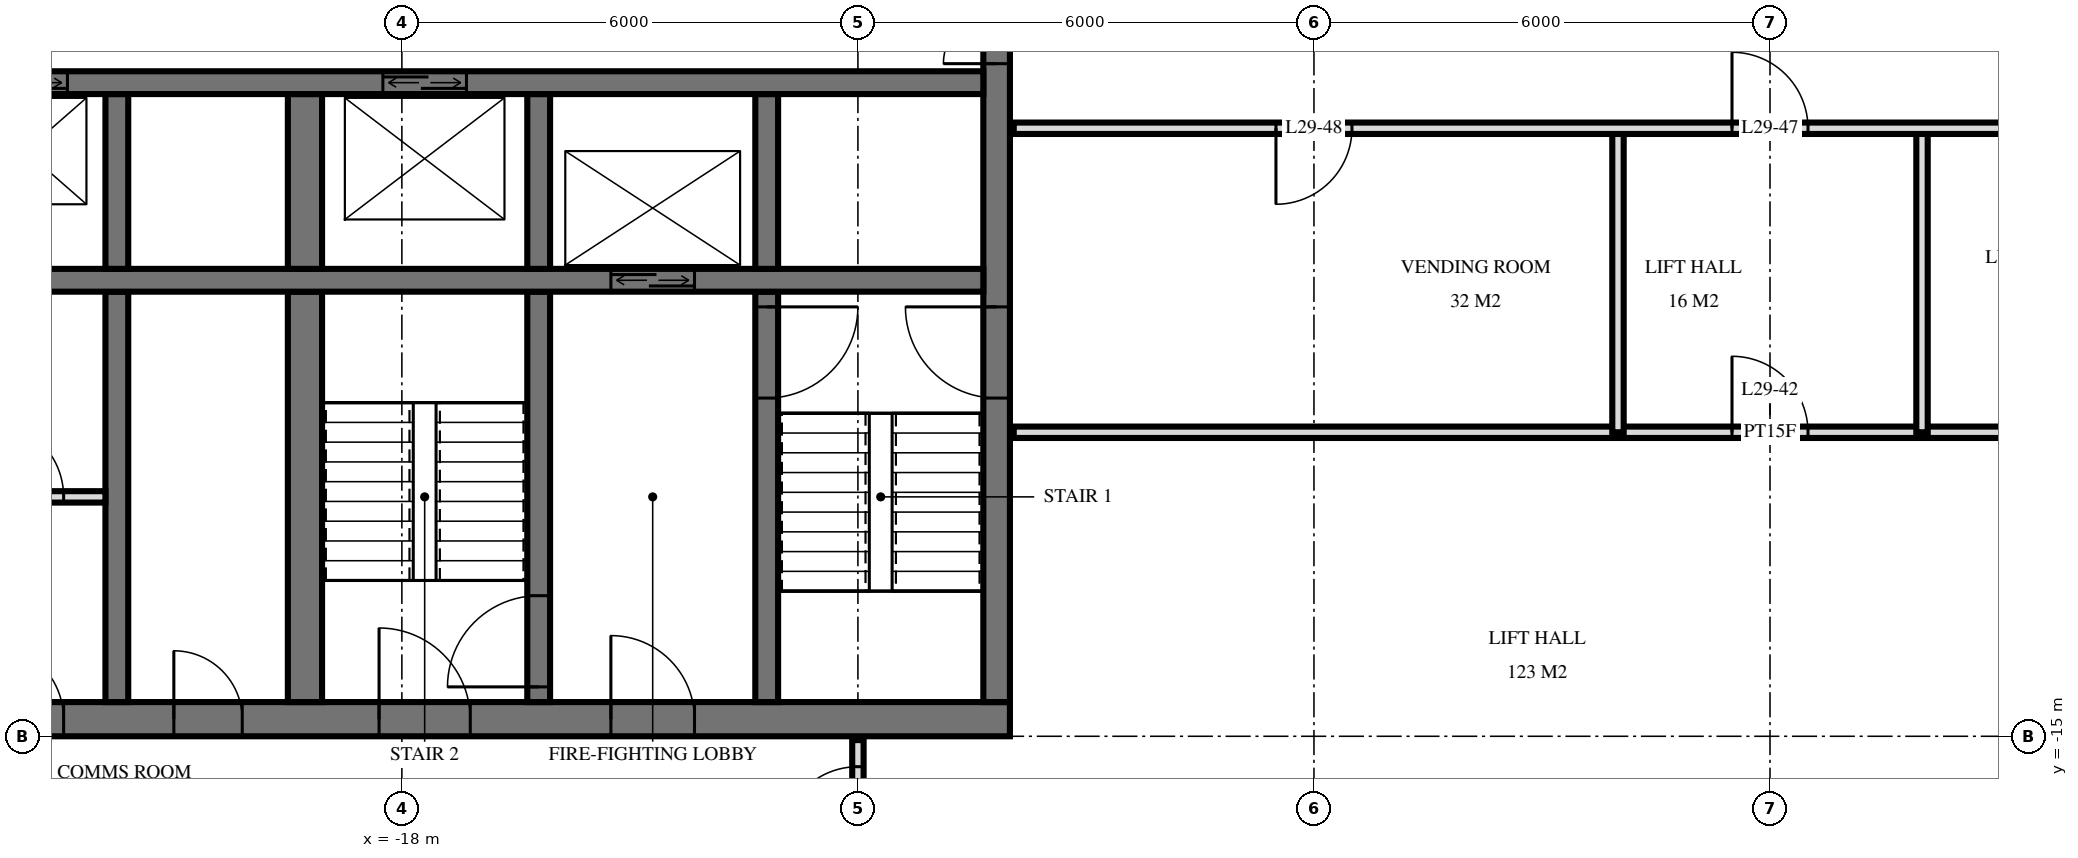
"""IFC4 building model, lengths in metres.
Left out: names, types, materials, properties, quantities, classifications, styles, units other than length and angle.
Written with IfcOpenShell. Run it as: python <this file> out.ifc"""

import sys

from ifc_helpers import new_model, si_unit, direction, frame, frame_2d, origin, place, context, subcontext, project, spatial, rectangle, extrude, element, fill, save


model = new_model("IFC4")
c1 = context("Model", 3, precision=1e-05, world=origin(), true_north=direction((0.0, 1.0)))
c2 = subcontext(c1, "Body", "Model", "MODEL_VIEW")
j1 = project(units=[si_unit("LENGTHUNIT", "METRE"), si_unit("PLANEANGLEUNIT", "RADIAN")], contexts=[c1])
p1 = place(None, origin())
s1 = spatial("IfcSite", under=j1, at=p1, CompositionType="ELEMENT")
p2 = place(p1, origin())
s2 = spatial("IfcBuilding", under=s1, at=p2, CompositionType="ELEMENT")
p3 = place(p2, frame((0.0, 0.0, 116.4)))
s3 = spatial("IfcBuildingStorey", under=s2, at=p3, CompositionType="ELEMENT", Elevation=116.4)
p4 = place(p3, frame((-24.5, -14.775, 0.0), z_axis=(0.0, 0.0, 1.0), x_axis=(1.0, 0.0, 0.0)))
e1 = element("IfcWall", 1, at=p4, inside=s3, PredefinedType="SHEAR", context=c2, shape_type="SweptSolid", body=[
    extrude(rectangle(XDim=14.5, YDim=0.45, at=frame_2d((7.25, 0.0))), origin(), (0.0, 0.0, 1.0), 3.6),
])
p5 = place(p4, frame((6.2, 0.0, 0.0)))
e2 = element("IfcOpeningElement", 2, at=p5, cuts=e1, PredefinedType="OPENING", context=c2, shape_type="SweptSolid", body=[
    extrude(rectangle(XDim=1.2, YDim=2.1, at=frame_2d((0.6, 1.05))), frame((0.0, 0.235, 0.0), z_axis=(0.0, -1.0, 0.0), x_axis=(1.0, 0.0, 0.0)), (0.0, 0.0, 1.0), 0.47),
])
p6 = place(p4, frame((9.25, 0.0, 0.0)))
e3 = element("IfcOpeningElement", 3, at=p6, cuts=e1, PredefinedType="OPENING", context=c2, shape_type="SweptSolid", body=[
    extrude(rectangle(XDim=1.1, YDim=2.1, at=frame_2d((0.55, 1.05))), frame((0.0, 0.235, 0.0), z_axis=(0.0, -1.0, 0.0), x_axis=(1.0, 0.0, 0.0)), (0.0, 0.0, 1.0), 0.47),
])
p7 = place(p4, frame((3.5, 0.0, 0.0)))
e4 = element("IfcOpeningElement", 4, at=p7, cuts=e1, PredefinedType="OPENING", context=c2, shape_type="SweptSolid", body=[
    extrude(rectangle(XDim=0.9, YDim=2.1, at=frame_2d((0.45, 1.05))), frame((0.0, 0.235, 0.0), z_axis=(0.0, -1.0, 0.0), x_axis=(1.0, 0.0, 0.0)), (0.0, 0.0, 1.0), 0.47),
])
p8 = place(p4, frame((1.05, 0.0, 0.0)))
e5 = element("IfcOpeningElement", 5, at=p8, cuts=e1, PredefinedType="OPENING", context=c2, shape_type="SweptSolid", body=[
    extrude(rectangle(XDim=1.0, YDim=2.1, at=frame_2d((0.5, 1.05))), frame((0.0, 0.235, 0.0), z_axis=(0.0, -1.0, 0.0), x_axis=(1.0, 0.0, 0.0)), (0.0, 0.0, 1.0), 0.47),
])
p9 = place(p3, frame((-10.175, -14.55, 0.0), z_axis=(0.0, 0.0, 1.0), x_axis=(0.0, 1.0, 0.0)))
e6 = element("IfcWall", 6, at=p9, inside=s3, PredefinedType="SHEAR", context=c2, shape_type="SweptSolid", body=[
    extrude(rectangle(XDim=14.1, YDim=0.35, at=frame_2d((7.05, 0.0))), origin(), (0.0, 0.0, 1.0), 3.6),
])
p10 = place(p9, frame((8.4, 0.0, 0.0)))
e7 = element("IfcOpeningElement", 7, at=p10, cuts=e6, PredefinedType="OPENING", context=c2, shape_type="SweptSolid", body=[
    extrude(rectangle(XDim=1.4, YDim=2.4, at=frame_2d((0.7, 1.2))), frame((0.0, 0.185, 0.0), z_axis=(0.0, -1.0, 0.0), x_axis=(1.0, 0.0, 0.0)), (0.0, 0.0, 1.0), 0.37),
])
p11 = place(p9, frame((10.0, 0.0, 0.0)))
e8 = element("IfcOpeningElement", 8, at=p11, cuts=e6, PredefinedType="OPENING", context=c2, shape_type="SweptSolid", body=[
    extrude(rectangle(XDim=1.4, YDim=2.4, at=frame_2d((0.7, 1.2))), frame((0.0, 0.185, 0.0), z_axis=(0.0, -1.0, 0.0), x_axis=(1.0, 0.0, 0.0)), (0.0, 0.0, 1.0), 0.37),
])
p12 = place(p9, frame((4.0, 0.0, 0.0)))
e9 = element("IfcOpeningElement", 9, at=p12, cuts=e6, PredefinedType="OPENING", context=c2, shape_type="SweptSolid", body=[
    extrude(rectangle(XDim=1.2, YDim=2.1, at=frame_2d((0.6, 1.05))), frame((0.0, 0.185, 0.0), z_axis=(0.0, -1.0, 0.0), x_axis=(1.0, 0.0, 0.0)), (0.0, 0.0, 1.0), 0.37),
])
p13 = place(p3, frame((-24.05, -6.4, 0.0), z_axis=(0.0, 0.0, 1.0), x_axis=(1.0, 0.0, 0.0)))
e10 = element("IfcWall", 10, at=p13, inside=s3, PredefinedType="SHEAR", context=c2, shape_type="SweptSolid", body=[
    extrude(rectangle(XDim=13.7, YDim=0.3, at=frame_2d((6.85, 0.0))), origin(), (0.0, 0.0, 1.0), 3.6),
])
p14 = place(p13, frame((0.55, 0.0, 0.0)))
e11 = element("IfcOpeningElement", 11, at=p14, cuts=e10, PredefinedType="OPENING", context=c2, shape_type="SweptSolid", body=[
    extrude(rectangle(XDim=1.1, YDim=2.1, at=frame_2d((0.55, 1.05))), frame((0.0, 0.16, 0.0), z_axis=(0.0, -1.0, 0.0), x_axis=(1.0, 0.0, 0.0)), (0.0, 0.0, 1.0), 0.32),
])
p15 = place(p13, frame((5.8, 0.0, 0.0)))
e12 = element("IfcOpeningElement", 12, at=p15, cuts=e10, PredefinedType="OPENING", context=c2, shape_type="SweptSolid", body=[
    extrude(rectangle(XDim=1.1, YDim=2.1, at=frame_2d((0.55, 1.05))), frame((0.0, 0.16, 0.0), z_axis=(0.0, -1.0, 0.0), x_axis=(1.0, 0.0, 0.0)), (0.0, 0.0, 1.0), 0.32),
])
p16 = place(p3, frame((-24.05, -9.0, 0.0), z_axis=(0.0, 0.0, 1.0), x_axis=(1.0, 0.0, 0.0)))
e13 = element("IfcWall", 13, at=p16, inside=s3, PredefinedType="SHEAR", context=c2, shape_type="SweptSolid", body=[
    extrude(rectangle(XDim=13.7, YDim=0.3, at=frame_2d((6.85, 0.0))), origin(), (0.0, 0.0, 1.0), 3.6),
])
p17 = place(p16, frame((8.8, 0.0, 0.0)))
e14 = element("IfcOpeningElement", 14, at=p17, cuts=e13, PredefinedType="OPENING", context=c2, shape_type="SweptSolid", body=[
    extrude(rectangle(XDim=1.1, YDim=2.1, at=frame_2d((0.55, 1.05))), frame((0.0, 0.16, 0.0), z_axis=(0.0, -1.0, 0.0), x_axis=(1.0, 0.0, 0.0)), (0.0, 0.0, 1.0), 0.32),
])
p18 = place(p3, frame((-13.2, -8.85, 0.0), z_axis=(0.0, 0.0, 1.0), x_axis=(0.0, 1.0, 0.0)))
e15 = element("IfcWall", 15, at=p18, inside=s3, PredefinedType="SHEAR", context=c2, shape_type="SweptSolid", body=[
    extrude(rectangle(XDim=2.3, YDim=0.3, at=frame_2d((1.15, 0.0))), origin(), (0.0, 0.0, 1.0), 3.6),
])
p19 = place(p3, frame((-13.2, -14.55, 0.0), z_axis=(0.0, 0.0, 1.0), x_axis=(0.0, 1.0, 0.0)))
e16 = element("IfcWall", 16, at=p19, inside=s3, PredefinedType="SHEAR", context=c2, shape_type="SweptSolid", body=[
    extrude(rectangle(XDim=5.4, YDim=0.3, at=frame_2d((2.7, 0.0))), origin(), (0.0, 0.0, 1.0), 3.6),
])
p20 = place(p19, frame((4.0, 0.0, 0.0)))
e17 = element("IfcOpeningElement", 17, at=p20, cuts=e16, PredefinedType="OPENING", context=c2, shape_type="SweptSolid", body=[
    extrude(rectangle(XDim=1.2, YDim=2.1, at=frame_2d((0.6, 1.05))), frame((0.0, 0.16, 0.0), z_axis=(0.0, -1.0, 0.0), x_axis=(1.0, 0.0, 0.0)), (0.0, 0.0, 1.0), 0.32),
])
p21 = place(p3, frame((-16.2, -8.85, 0.0), z_axis=(0.0, 0.0, 1.0), x_axis=(0.0, 1.0, 0.0)))
e18 = element("IfcWall", 18, at=p21, inside=s3, PredefinedType="SHEAR", context=c2, shape_type="SweptSolid", body=[
    extrude(rectangle(XDim=2.3, YDim=0.3, at=frame_2d((1.15, 0.0))), origin(), (0.0, 0.0, 1.0), 3.6),
])
p22 = place(p3, frame((-16.2, -14.55, 0.0), z_axis=(0.0, 0.0, 1.0), x_axis=(0.0, 1.0, 0.0)))
e19 = element("IfcWall", 19, at=p22, inside=s3, PredefinedType="SHEAR", context=c2, shape_type="SweptSolid", body=[
    extrude(rectangle(XDim=5.4, YDim=0.3, at=frame_2d((2.7, 0.0))), origin(), (0.0, 0.0, 1.0), 3.6),
])
p23 = place(p22, frame((0.2, 0.0, 0.0)))
e20 = element("IfcOpeningElement", 20, at=p23, cuts=e19, PredefinedType="OPENING", context=c2, shape_type="SweptSolid", body=[
    extrude(rectangle(XDim=1.2, YDim=2.1, at=frame_2d((0.6, 1.05))), frame((0.0, 0.16, 0.0), z_axis=(0.0, -1.0, 0.0), x_axis=(1.0, 0.0, 0.0)), (0.0, 0.0, 1.0), 0.32),
])
p24 = place(p3, frame((-19.275, -8.85, 0.0), z_axis=(0.0, 0.0, 1.0), x_axis=(0.0, 1.0, 0.0)))
e21 = element("IfcWall", 21, at=p24, inside=s3, PredefinedType="SHEAR", context=c2, shape_type="SweptSolid", body=[
    extrude(rectangle(XDim=2.3, YDim=0.45, at=frame_2d((1.15, 0.0))), origin(), (0.0, 0.0, 1.0), 3.6),
])
p25 = place(p3, frame((-19.275, -14.55, 0.0), z_axis=(0.0, 0.0, 1.0), x_axis=(0.0, 1.0, 0.0)))
e22 = element("IfcWall", 22, at=p25, inside=s3, PredefinedType="SHEAR", context=c2, shape_type="SweptSolid", body=[
    extrude(rectangle(XDim=5.4, YDim=0.45, at=frame_2d((2.7, 0.0))), origin(), (0.0, 0.0, 1.0), 3.6),
])
p26 = place(p3, frame((-21.75, -8.85, 0.0), z_axis=(0.0, 0.0, 1.0), x_axis=(0.0, 1.0, 0.0)))
e23 = element("IfcWall", 23, at=p26, inside=s3, PredefinedType="SHEAR", context=c2, shape_type="SweptSolid", body=[
    extrude(rectangle(XDim=2.3, YDim=0.3, at=frame_2d((1.15, 0.0))), origin(), (0.0, 0.0, 1.0), 3.6),
])
p27 = place(p3, frame((-21.75, -14.55, 0.0), z_axis=(0.0, 0.0, 1.0), x_axis=(0.0, 1.0, 0.0)))
e24 = element("IfcWall", 24, at=p27, inside=s3, PredefinedType="SHEAR", context=c2, shape_type="SweptSolid", body=[
    extrude(rectangle(XDim=5.4, YDim=0.3, at=frame_2d((2.7, 0.0))), origin(), (0.0, 0.0, 1.0), 3.6),
])
p28 = place(p3, frame((-24.0, -11.85, 0.0), z_axis=(0.0, 0.0, 1.0), x_axis=(1.0, 0.0, 0.0)))
e25 = element("IfcWall", 25, at=p28, inside=s3, PredefinedType="PARTITIONING", context=c2, shape_type="SweptSolid", body=[
    extrude(rectangle(XDim=2.1, YDim=0.15, at=frame_2d((1.05, 0.0))), origin(), (0.0, 0.0, 1.0), 3.3),
])
p29 = place(p28, frame((0.55, 0.0, 0.0)))
e26 = element("IfcOpeningElement", 26, at=p29, cuts=e25, PredefinedType="OPENING", context=c2, shape_type="SweptSolid", body=[
    extrude(rectangle(XDim=1.0, YDim=2.1, at=frame_2d((0.5, 1.05))), frame((0.0, 0.085, 0.0), z_axis=(0.0, -1.0, 0.0), x_axis=(1.0, 0.0, 0.0)), (0.0, 0.0, 1.0), 0.17),
])
for number, where, z_axis, x_axis in (
    (27, (2.0, -11.0, 0.0), (0.0, 0.0, 1.0), (0.0, 1.0, 0.0)),
    (28, (-2.0, -11.0, 0.0), (0.0, 0.0, 1.0), (0.0, 1.0, 0.0)),
):
    element("IfcWall", number, at=place(p3, frame(where, z_axis=z_axis, x_axis=x_axis)), inside=s3, PredefinedType="PARTITIONING", context=c2, shape_type="SweptSolid", body=[
        extrude(rectangle(XDim=4.0, YDim=0.15, at=frame_2d((2.0, 0.0))), origin(), (0.0, 0.0, 1.0), 3.32),
    ])
p30 = place(p3, frame((-12.0, -16.8, 0.0), z_axis=(0.0, 0.0, 1.0), x_axis=(0.0, 1.0, 0.0)))
e29 = element("IfcWall", 29, at=p30, inside=s3, PredefinedType="PARTITIONING", context=c2, shape_type="SweptSolid", body=[
    extrude(rectangle(XDim=1.75, YDim=0.15, at=frame_2d((0.875, 0.0))), origin(), (0.0, 0.0, 1.0), 3.32),
])
p31 = place(p30, frame((0.4, 0.0, 0.0)))
e30 = element("IfcOpeningElement", 30, at=p31, cuts=e29, PredefinedType="OPENING", context=c2, shape_type="SweptSolid", body=[
    extrude(rectangle(XDim=1.0, YDim=2.1, at=frame_2d((0.5, 1.05))), frame((0.0, 0.085, 0.0), z_axis=(0.0, -1.0, 0.0), x_axis=(1.0, 0.0, 0.0)), (0.0, 0.0, 1.0), 0.17),
])
p32 = place(p3, frame((-9.95, -11.0, 0.0), z_axis=(0.0, 0.0, 1.0), x_axis=(1.0, 0.0, 0.0)))
e31 = element("IfcWall", 31, at=p32, inside=s3, PredefinedType="PARTITIONING", context=c2, shape_type="SweptSolid", body=[
    extrude(rectangle(XDim=19.9, YDim=0.15, at=frame_2d((9.95, 0.0))), origin(), (0.0, 0.0, 1.0), 3.32),
])
p33 = place(p32, frame((9.45, 0.0, 0.0)))
e32 = element("IfcOpeningElement", 32, at=p33, cuts=e31, PredefinedType="OPENING", context=c2, shape_type="SweptSolid", body=[
    extrude(rectangle(XDim=1.0, YDim=2.1, at=frame_2d((0.5, 1.05))), frame((0.0, 0.085, 0.0), z_axis=(0.0, -1.0, 0.0), x_axis=(1.0, 0.0, 0.0)), (0.0, 0.0, 1.0), 0.17),
])
p34 = place(p32, frame((15.45, 0.0, 0.0)))
e33 = element("IfcOpeningElement", 33, at=p34, cuts=e31, PredefinedType="OPENING", context=c2, shape_type="SweptSolid", body=[
    extrude(rectangle(XDim=1.0, YDim=2.1, at=frame_2d((0.5, 1.05))), frame((0.0, 0.085, 0.0), z_axis=(0.0, -1.0, 0.0), x_axis=(1.0, 0.0, 0.0)), (0.0, 0.0, 1.0), 0.17),
])
p35 = place(p3, frame((-9.95, -7.0, 0.0), z_axis=(0.0, 0.0, 1.0), x_axis=(1.0, 0.0, 0.0)))
e34 = element("IfcWall", 34, at=p35, inside=s3, PredefinedType="PARTITIONING", context=c2, shape_type="SweptSolid", body=[
    extrude(rectangle(XDim=19.9, YDim=0.15, at=frame_2d((9.95, 0.0))), origin(), (0.0, 0.0, 1.0), 3.32),
])
p36 = place(p35, frame((9.45, 0.0, 0.0)))
e35 = element("IfcOpeningElement", 35, at=p36, cuts=e34, PredefinedType="OPENING", context=c2, shape_type="SweptSolid", body=[
    extrude(rectangle(XDim=1.0, YDim=2.1, at=frame_2d((0.5, 1.05))), frame((0.0, 0.085, 0.0), z_axis=(0.0, -1.0, 0.0), x_axis=(1.0, 0.0, 0.0)), (0.0, 0.0, 1.0), 0.17),
])
p37 = place(p35, frame((3.45, 0.0, 0.0)))
e36 = element("IfcOpeningElement", 36, at=p37, cuts=e34, PredefinedType="OPENING", context=c2, shape_type="SweptSolid", body=[
    extrude(rectangle(XDim=1.0, YDim=2.1, at=frame_2d((0.5, 1.05))), frame((0.0, 0.085, 0.0), z_axis=(0.0, -1.0, 0.0), x_axis=(1.0, 0.0, 0.0)), (0.0, 0.0, 1.0), 0.17),
])
p38 = place(p14, origin())
e37 = element("IfcDoor", 37, at=p38, inside=s3, OperationType="DOUBLE_DOOR_SLIDING", PredefinedType="USERDEFINED", context=c2, shape_type="SweptSolid", body=[
    extrude(rectangle(XDim=1.1, YDim=2.1, at=frame_2d((0.55, 1.05))), frame((0.0, 0.025, 0.0), z_axis=(0.0, -1.0, 0.0), x_axis=(1.0, 0.0, 0.0)), (0.0, 0.0, 1.0), 0.05),
])
fill(e11, e37)
p39 = place(p17, origin())
e38 = element("IfcDoor", 38, at=p39, inside=s3, OperationType="DOUBLE_DOOR_SLIDING", PredefinedType="USERDEFINED", context=c2, shape_type="SweptSolid", body=[
    extrude(rectangle(XDim=1.1, YDim=2.1, at=frame_2d((0.55, 1.05))), frame((0.0, 0.025, 0.0), z_axis=(0.0, -1.0, 0.0), x_axis=(1.0, 0.0, 0.0)), (0.0, 0.0, 1.0), 0.05),
])
fill(e14, e38)
p40 = place(p15, origin())
e39 = element("IfcDoor", 39, at=p40, inside=s3, OperationType="DOUBLE_DOOR_SLIDING", PredefinedType="USERDEFINED", context=c2, shape_type="SweptSolid", body=[
    extrude(rectangle(XDim=1.1, YDim=2.1, at=frame_2d((0.55, 1.05))), frame((0.0, 0.025, 0.0), z_axis=(0.0, -1.0, 0.0), x_axis=(1.0, 0.0, 0.0)), (0.0, 0.0, 1.0), 0.05),
])
fill(e12, e39)
p41 = place(p10, origin())
e40 = element("IfcDoor", 40, at=p41, inside=s3, OperationType="DOUBLE_DOOR_SINGLE_SWING", PredefinedType="DOOR", context=c2, shape_type="SweptSolid", body=[
    extrude(rectangle(XDim=1.4, YDim=2.4, at=frame_2d((0.7, 1.2))), frame((0.0, 0.025, 0.0), z_axis=(0.0, -1.0, 0.0), x_axis=(1.0, 0.0, 0.0)), (0.0, 0.0, 1.0), 0.05),
])
fill(e7, e40)
p42 = place(p12, origin())
e41 = element("IfcDoor", 41, at=p42, inside=s3, OperationType="SINGLE_SWING_LEFT", PredefinedType="DOOR", context=c2, shape_type="SweptSolid", body=[
    extrude(rectangle(XDim=1.2, YDim=2.1, at=frame_2d((0.6, 1.05))), frame((0.0, 0.025, 0.0), z_axis=(0.0, -1.0, 0.0), x_axis=(1.0, 0.0, 0.0)), (0.0, 0.0, 1.0), 0.05),
])
fill(e9, e41)
p43 = place(p5, origin())
e42 = element("IfcDoor", 42, at=p43, inside=s3, OperationType="SINGLE_SWING_RIGHT", PredefinedType="DOOR", context=c2, shape_type="SweptSolid", body=[
    extrude(rectangle(XDim=1.2, YDim=2.1, at=frame_2d((0.6, 1.05))), frame((0.0, 0.025, 0.0), z_axis=(0.0, -1.0, 0.0), x_axis=(1.0, 0.0, 0.0)), (0.0, 0.0, 1.0), 0.05),
])
fill(e2, e42)
p44 = place(p6, origin())
e43 = element("IfcDoor", 43, at=p44, inside=s3, OperationType="SINGLE_SWING_RIGHT", PredefinedType="DOOR", context=c2, shape_type="SweptSolid", body=[
    extrude(rectangle(XDim=1.1, YDim=2.1, at=frame_2d((0.55, 1.05))), frame((0.0, 0.025, 0.0), z_axis=(0.0, -1.0, 0.0), x_axis=(1.0, 0.0, 0.0)), (0.0, 0.0, 1.0), 0.05),
])
fill(e3, e43)
p45 = place(p7, origin())
e44 = element("IfcDoor", 44, at=p45, inside=s3, OperationType="SINGLE_SWING_RIGHT", PredefinedType="DOOR", context=c2, shape_type="SweptSolid", body=[
    extrude(rectangle(XDim=0.9, YDim=2.1, at=frame_2d((0.45, 1.05))), frame((0.0, 0.025, 0.0), z_axis=(0.0, -1.0, 0.0), x_axis=(1.0, 0.0, 0.0)), (0.0, 0.0, 1.0), 0.05),
])
fill(e4, e44)
p46 = place(p8, origin())
e45 = element("IfcDoor", 45, at=p46, inside=s3, OperationType="SINGLE_SWING_RIGHT", PredefinedType="DOOR", context=c2, shape_type="SweptSolid", body=[
    extrude(rectangle(XDim=1.0, YDim=2.1, at=frame_2d((0.5, 1.05))), frame((0.0, 0.025, 0.0), z_axis=(0.0, -1.0, 0.0), x_axis=(1.0, 0.0, 0.0)), (0.0, 0.0, 1.0), 0.05),
])
fill(e5, e45)
p47 = place(p20, frame((0.6, 0.0, 0.0), z_axis=(0.0, 0.0, 1.0), x_axis=(-1.0, 0.0, 0.0)))
e46 = element("IfcDoor", 46, at=p47, inside=s3, OperationType="SINGLE_SWING_RIGHT", PredefinedType="DOOR", context=c2, shape_type="SweptSolid", body=[
    extrude(rectangle(XDim=1.2, YDim=2.1, at=frame_2d((0.0, 1.05))), frame((0.0, -0.025, 0.0), z_axis=(0.0, 1.0, 0.0), x_axis=(-1.0, 0.0, 0.0)), (0.0, 0.0, 1.0), 0.05),
])
fill(e17, e46)
p48 = place(p23, origin())
e47 = element("IfcDoor", 47, at=p48, inside=s3, OperationType="SINGLE_SWING_RIGHT", PredefinedType="DOOR", context=c2, shape_type="SweptSolid", body=[
    extrude(rectangle(XDim=1.2, YDim=2.1, at=frame_2d((0.6, 1.05))), frame((0.0, 0.025, 0.0), z_axis=(0.0, -1.0, 0.0), x_axis=(1.0, 0.0, 0.0)), (0.0, 0.0, 1.0), 0.05),
])
fill(e20, e47)
p49 = place(p29, origin())
e48 = element("IfcDoor", 48, at=p49, inside=s3, OperationType="SINGLE_SWING_RIGHT", PredefinedType="DOOR", context=c2, shape_type="SweptSolid", body=[
    extrude(rectangle(XDim=1.0, YDim=2.1, at=frame_2d((0.5, 1.05))), frame((0.0, 0.025, 0.0), z_axis=(0.0, -1.0, 0.0), x_axis=(1.0, 0.0, 0.0)), (0.0, 0.0, 1.0), 0.05),
])
fill(e26, e48)
p50 = place(p31, origin())
e49 = element("IfcDoor", 49, at=p50, inside=s3, OperationType="SINGLE_SWING_RIGHT", PredefinedType="DOOR", context=c2, shape_type="SweptSolid", body=[
    extrude(rectangle(XDim=1.0, YDim=2.1, at=frame_2d((0.5, 1.05))), frame((0.0, 0.025, 0.0), z_axis=(0.0, -1.0, 0.0), x_axis=(1.0, 0.0, 0.0)), (0.0, 0.0, 1.0), 0.05),
])
fill(e30, e49)
p51 = place(p33, origin())
e50 = element("IfcDoor", 50, at=p51, inside=s3, OperationType="SINGLE_SWING_RIGHT", PredefinedType="DOOR", context=c2, shape_type="SweptSolid", body=[
    extrude(rectangle(XDim=1.0, YDim=2.1, at=frame_2d((0.5, 1.05))), frame((0.0, 0.025, 0.0), z_axis=(0.0, -1.0, 0.0), x_axis=(1.0, 0.0, 0.0)), (0.0, 0.0, 1.0), 0.05),
])
fill(e32, e50)
p52 = place(p36, origin())
e51 = element("IfcDoor", 51, at=p52, inside=s3, OperationType="SINGLE_SWING_RIGHT", PredefinedType="DOOR", context=c2, shape_type="SweptSolid", body=[
    extrude(rectangle(XDim=1.0, YDim=2.1, at=frame_2d((0.5, 1.05))), frame((0.0, 0.025, 0.0), z_axis=(0.0, -1.0, 0.0), x_axis=(1.0, 0.0, 0.0)), (0.0, 0.0, 1.0), 0.05),
])
fill(e35, e51)
p53 = place(p37, frame((0.5, 0.0, 0.0), z_axis=(0.0, 0.0, 1.0), x_axis=(-1.0, 0.0, 0.0)))
e52 = element("IfcDoor", 52, at=p53, inside=s3, OperationType="SINGLE_SWING_LEFT", PredefinedType="DOOR", context=c2, shape_type="SweptSolid", body=[
    extrude(rectangle(XDim=1.0, YDim=2.1, at=frame_2d((0.0, 1.05))), frame((0.0, -0.025, 0.0), z_axis=(0.0, 1.0, 0.0), x_axis=(-1.0, 0.0, 0.0)), (0.0, 0.0, 1.0), 0.05),
])
fill(e36, e52)
save(model, sys.argv[1])
